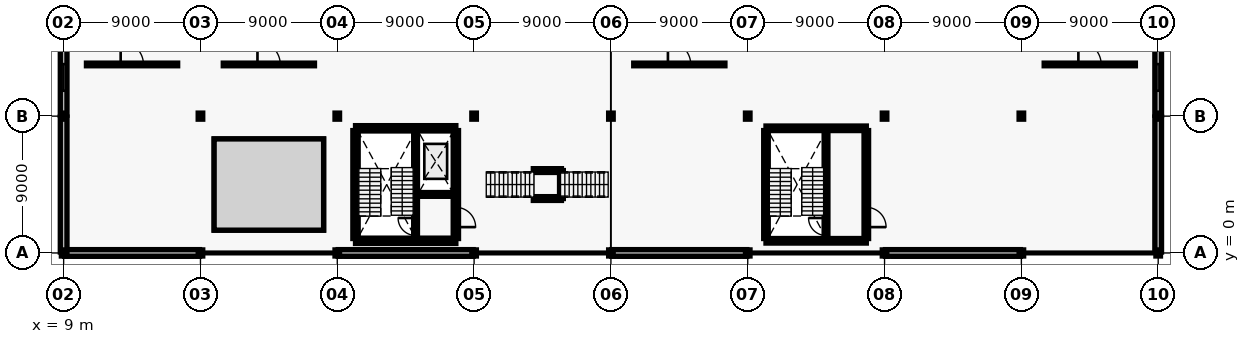
"""IFC4 building model, lengths in metres.
Left out: names, types, materials, properties, quantities, classifications, styles, units other than length and angle.
Written with IfcOpenShell. Run it as: python <this file> out.ifc"""

import sys

from ifc_helpers import new_model, si_unit, direction, frame, frame_2d, origin, origin_2d, place, context, subcontext, project, spatial, rectangle, i_section, extrude, element, fill, save


model = new_model("IFC4")
c1 = context("Model", 3, precision=1e-05, world=origin(), true_north=direction((0.0, 1.0)))
c2 = subcontext(c1, "Body", "Model", "MODEL_VIEW")
j1 = project(units=[si_unit("LENGTHUNIT", "METRE"), si_unit("PLANEANGLEUNIT", "RADIAN")], contexts=[c1])
p1 = place(None, origin())
s1 = spatial("IfcSite", under=j1, at=p1, CompositionType="ELEMENT")
p2 = place(p1, origin())
s2 = spatial("IfcBuilding", under=s1, at=p2, CompositionType="ELEMENT")
p3 = place(p2, frame((0.0, 0.0, 5.4)))
s3 = spatial("IfcBuildingStorey", under=s2, at=p3, CompositionType="ELEMENT", Elevation=5.4)
for number, where, z_axis, x_axis in (
    (1, (9.0, 0.0, 0.0), (0.0, 0.0, 1.0), (1.0, 0.0, 0.0)),
    (2, (9.0, 9.0, 0.0), (0.0, 0.0, 1.0), (1.0, 0.0, 0.0)),
    (3, (18.0, 0.0, 0.0), (0.0, 0.0, 1.0), (1.0, 0.0, 0.0)),
    (4, (18.0, 9.0, 0.0), (0.0, 0.0, 1.0), (1.0, 0.0, 0.0)),
    (5, (27.0, 0.0, 0.0), (0.0, 0.0, 1.0), (1.0, 0.0, 0.0)),
    (6, (27.0, 9.0, 0.0), (0.0, 0.0, 1.0), (1.0, 0.0, 0.0)),
    (7, (36.0, 0.0, 0.0), (0.0, 0.0, 1.0), (1.0, 0.0, 0.0)),
    (8, (36.0, 9.0, 0.0), (0.0, 0.0, 1.0), (1.0, 0.0, 0.0)),
    (9, (45.0, 0.0, 0.0), (0.0, 0.0, 1.0), (1.0, 0.0, 0.0)),
    (10, (45.0, 9.0, 0.0), (0.0, 0.0, 1.0), (1.0, 0.0, 0.0)),
    (11, (54.0, 0.0, 0.0), (0.0, 0.0, 1.0), (1.0, 0.0, 0.0)),
    (12, (54.0, 9.0, 0.0), (0.0, 0.0, 1.0), (1.0, 0.0, 0.0)),
    (13, (63.0, 0.0, 0.0), (0.0, 0.0, 1.0), (1.0, 0.0, 0.0)),
    (14, (63.0, 9.0, 0.0), (0.0, 0.0, 1.0), (1.0, 0.0, 0.0)),
    (15, (72.0, 0.0, 0.0), (0.0, 0.0, 1.0), (1.0, 0.0, 0.0)),
    (16, (72.0, 9.0, 0.0), (0.0, 0.0, 1.0), (1.0, 0.0, 0.0)),
    (17, (81.0, 0.0, 0.0), (0.0, 0.0, 1.0), (1.0, 0.0, 0.0)),
    (18, (81.0, 9.0, 0.0), (0.0, 0.0, 1.0), (1.0, 0.0, 0.0)),
):
    element("IfcColumn", number, at=place(p3, frame(where, z_axis=z_axis, x_axis=x_axis)), inside=s3, PredefinedType="COLUMN", context=c2, shape_type="SweptSolid", body=[
        extrude(i_section(OverallWidth=0.3, OverallDepth=0.4, WebThickness=0.013, FlangeThickness=0.024, FilletRadius=0.027, at=origin_2d()), origin(), (0.0, 0.0, 1.0), 4.2),
    ])
for number, where, z_axis, x_axis in (
    (19, (9.06, 0.0, 0.0), (0.0, 0.0, 1.0), (1.0, 0.0, 0.0)),
    (20, (27.06, 0.0, 0.0), (0.0, 0.0, 1.0), (1.0, 0.0, 0.0)),
    (21, (45.06, 0.0, 0.0), (0.0, 0.0, 1.0), (1.0, 0.0, 0.0)),
    (22, (63.06, 0.0, 0.0), (0.0, 0.0, 1.0), (1.0, 0.0, 0.0)),
    (23, (9.0, 0.06, 0.0), (0.0, 0.0, 1.0), (0.0, 1.0, 0.0)),
):
    element("IfcWall", number, at=place(p3, frame(where, z_axis=z_axis, x_axis=x_axis)), inside=s3, PredefinedType="SOLIDWALL", context=c2, shape_type="SweptSolid", body=[
        extrude(rectangle(XDim=8.88, YDim=0.44, at=frame_2d((4.44, 0.0))), origin(), (0.0, 0.0, 1.0), 3.5),
    ])
p4 = place(p3, frame((9.0, 9.06, 0.0), z_axis=(0.0, 0.0, 1.0), x_axis=(0.0, 1.0, 0.0)))
e24 = element("IfcWall", 24, at=p4, inside=s3, PredefinedType="SOLIDWALL", context=c2, shape_type="SweptSolid", body=[
    extrude(rectangle(XDim=8.88, YDim=0.44, at=frame_2d((4.44, 0.0))), origin(), (0.0, 0.0, 1.0), 3.5),
])
p5 = place(p4, frame((1.611, 0.0, 0.9)))
e25 = element("IfcOpeningElement", 25, at=p5, cuts=e24, PredefinedType="OPENING", context=c2, shape_type="SweptSolid", body=[
    extrude(rectangle(XDim=1.75, YDim=2.25, at=frame_2d((0.875, 1.125))), frame((0.0, 0.23, 0.0), z_axis=(0.0, -1.0, 0.0), x_axis=(1.0, 0.0, 0.0)), (0.0, 0.0, 1.0), 0.46),
])
p6 = place(p4, frame((5.519, 0.0, 0.9)))
e26 = element("IfcOpeningElement", 26, at=p6, cuts=e24, PredefinedType="OPENING", context=c2, shape_type="SweptSolid", body=[
    extrude(rectangle(XDim=1.75, YDim=2.25, at=frame_2d((0.875, 1.125))), frame((0.0, 0.23, 0.0), z_axis=(0.0, -1.0, 0.0), x_axis=(1.0, 0.0, 0.0)), (0.0, 0.0, 1.0), 0.46),
])
p7 = place(p3, frame((81.0, 0.06, 0.0), z_axis=(0.0, 0.0, 1.0), x_axis=(0.0, 1.0, 0.0)))
e27 = element("IfcWall", 27, at=p7, inside=s3, PredefinedType="SOLIDWALL", context=c2, shape_type="SweptSolid", body=[
    extrude(rectangle(XDim=8.88, YDim=0.44, at=frame_2d((4.44, 0.0))), origin(), (0.0, 0.0, 1.0), 3.5),
])
p8 = place(p3, frame((81.0, 9.06, 0.0), z_axis=(0.0, 0.0, 1.0), x_axis=(0.0, 1.0, 0.0)))
e28 = element("IfcWall", 28, at=p8, inside=s3, PredefinedType="SOLIDWALL", context=c2, shape_type="SweptSolid", body=[
    extrude(rectangle(XDim=8.88, YDim=0.44, at=frame_2d((4.44, 0.0))), origin(), (0.0, 0.0, 1.0), 3.5),
])
p9 = place(p8, frame((1.611, 0.0, 0.9)))
e29 = element("IfcOpeningElement", 29, at=p9, cuts=e28, PredefinedType="OPENING", context=c2, shape_type="SweptSolid", body=[
    extrude(rectangle(XDim=1.75, YDim=2.25, at=frame_2d((0.875, 1.125))), frame((0.0, 0.23, 0.0), z_axis=(0.0, -1.0, 0.0), x_axis=(1.0, 0.0, 0.0)), (0.0, 0.0, 1.0), 0.46),
])
p10 = place(p8, frame((5.519, 0.0, 0.9)))
e30 = element("IfcOpeningElement", 30, at=p10, cuts=e28, PredefinedType="OPENING", context=c2, shape_type="SweptSolid", body=[
    extrude(rectangle(XDim=1.75, YDim=2.25, at=frame_2d((0.875, 1.125))), frame((0.0, 0.23, 0.0), z_axis=(0.0, -1.0, 0.0), x_axis=(1.0, 0.0, 0.0)), (0.0, 0.0, 1.0), 0.46),
])
for number, where, z_axis, x_axis in (
    (31, (28.2, 0.8, 0.0), (0.0, 0.0, 1.0), (1.0, 0.0, 0.0)),
    (32, (28.2, 8.2, 0.0), (0.0, 0.0, 1.0), (1.0, 0.0, 0.0)),
):
    element("IfcWall", number, at=place(p3, frame(where, z_axis=z_axis, x_axis=x_axis)), inside=s3, PredefinedType="SHEAR", context=c2, shape_type="SweptSolid", body=[
        extrude(rectangle(XDim=6.6, YDim=0.35, at=frame_2d((3.3, 0.0))), origin(), (0.0, 0.0, 1.0), 4.2),
    ])
p11 = place(p3, frame((28.2, 0.95, 0.0), z_axis=(0.0, 0.0, 1.0), x_axis=(0.0, 1.0, 0.0)))
e33 = element("IfcWall", 33, at=p11, inside=s3, PredefinedType="SHEAR", context=c2, shape_type="SweptSolid", body=[
    extrude(rectangle(XDim=7.1, YDim=0.35, at=frame_2d((3.55, 0.0))), origin(), (0.0, 0.0, 1.0), 4.2),
])
p12 = place(p3, frame((34.8, 0.95, 0.0), z_axis=(0.0, 0.0, 1.0), x_axis=(0.0, 1.0, 0.0)))
e34 = element("IfcWall", 34, at=p12, inside=s3, PredefinedType="SHEAR", context=c2, shape_type="SweptSolid", body=[
    extrude(rectangle(XDim=7.1, YDim=0.35, at=frame_2d((3.55, 0.0))), origin(), (0.0, 0.0, 1.0), 4.2),
])
p13 = place(p12, frame((0.75, 0.0, 0.0)))
e35 = element("IfcOpeningElement", 35, at=p13, cuts=e34, PredefinedType="OPENING", context=c2, shape_type="SweptSolid", body=[
    extrude(rectangle(XDim=1.3, YDim=2.15, at=frame_2d((0.65, 1.075))), frame((0.0, 0.185, 0.0), z_axis=(0.0, -1.0, 0.0), x_axis=(1.0, 0.0, 0.0)), (0.0, 0.0, 1.0), 0.37),
])
p14 = place(p3, frame((32.15, 0.95, 0.0), z_axis=(0.0, 0.0, 1.0), x_axis=(0.0, 1.0, 0.0)))
e36 = element("IfcWall", 36, at=p14, inside=s3, PredefinedType="SHEAR", context=c2, shape_type="SweptSolid", body=[
    extrude(rectangle(XDim=7.1, YDim=0.25, at=frame_2d((3.55, 0.0))), origin(), (0.0, 0.0, 1.0), 4.2),
])
p15 = place(p14, frame((0.2, 0.0, 0.0)))
e37 = element("IfcOpeningElement", 37, at=p15, cuts=e36, PredefinedType="OPENING", context=c2, shape_type="SweptSolid", body=[
    extrude(rectangle(XDim=1.15, YDim=2.15, at=frame_2d((0.575, 1.075))), frame((0.0, 0.135, 0.0), z_axis=(0.0, -1.0, 0.0), x_axis=(1.0, 0.0, 0.0)), (0.0, 0.0, 1.0), 0.27),
])
p16 = place(p3, frame((32.27, 3.85, 0.0), z_axis=(0.0, 0.0, 1.0), x_axis=(1.0, 0.0, 0.0)))
e38 = element("IfcWall", 38, at=p16, inside=s3, PredefinedType="SHEAR", context=c2, shape_type="SweptSolid", body=[
    extrude(rectangle(XDim=2.38, YDim=0.25, at=frame_2d((1.19, 0.0))), origin(), (0.0, 0.0, 1.0), 4.2),
])
p17 = place(p16, frame((0.64, 0.0, 0.0)))
e39 = element("IfcOpeningElement", 39, at=p17, cuts=e38, PredefinedType="OPENING", context=c2, shape_type="SweptSolid", body=[
    extrude(rectangle(XDim=1.1, YDim=2.15, at=frame_2d((0.55, 1.075))), frame((0.0, 0.135, 0.0), z_axis=(0.0, -1.0, 0.0), x_axis=(1.0, 0.0, 0.0)), (0.0, 0.0, 1.0), 0.27),
])
for number, where, z_axis, x_axis in (
    (40, (55.2, 0.8, 0.0), (0.0, 0.0, 1.0), (1.0, 0.0, 0.0)),
    (41, (55.2, 8.2, 0.0), (0.0, 0.0, 1.0), (1.0, 0.0, 0.0)),
):
    element("IfcWall", number, at=place(p3, frame(where, z_axis=z_axis, x_axis=x_axis)), inside=s3, PredefinedType="SHEAR", context=c2, shape_type="SweptSolid", body=[
        extrude(rectangle(XDim=6.6, YDim=0.3, at=frame_2d((3.3, 0.0))), origin(), (0.0, 0.0, 1.0), 4.2),
    ])
p18 = place(p3, frame((55.2, 0.95, 0.0), z_axis=(0.0, 0.0, 1.0), x_axis=(0.0, 1.0, 0.0)))
e42 = element("IfcWall", 42, at=p18, inside=s3, PredefinedType="SHEAR", context=c2, shape_type="SweptSolid", body=[
    extrude(rectangle(XDim=7.1, YDim=0.3, at=frame_2d((3.55, 0.0))), origin(), (0.0, 0.0, 1.0), 4.2),
])
p19 = place(p3, frame((61.8, 0.95, 0.0), z_axis=(0.0, 0.0, 1.0), x_axis=(0.0, 1.0, 0.0)))
e43 = element("IfcWall", 43, at=p19, inside=s3, PredefinedType="SHEAR", context=c2, shape_type="SweptSolid", body=[
    extrude(rectangle(XDim=7.1, YDim=0.3, at=frame_2d((3.55, 0.0))), origin(), (0.0, 0.0, 1.0), 4.2),
])
p20 = place(p19, frame((0.75, 0.0, 0.0)))
e44 = element("IfcOpeningElement", 44, at=p20, cuts=e43, PredefinedType="OPENING", context=c2, shape_type="SweptSolid", body=[
    extrude(rectangle(XDim=1.3, YDim=2.15, at=frame_2d((0.65, 1.075))), frame((0.0, 0.16, 0.0), z_axis=(0.0, -1.0, 0.0), x_axis=(1.0, 0.0, 0.0)), (0.0, 0.0, 1.0), 0.32),
])
p21 = place(p3, frame((59.15, 0.95, 0.0), z_axis=(0.0, 0.0, 1.0), x_axis=(0.0, 1.0, 0.0)))
e45 = element("IfcWall", 45, at=p21, inside=s3, PredefinedType="SHEAR", context=c2, shape_type="SweptSolid", body=[
    extrude(rectangle(XDim=7.1, YDim=0.25, at=frame_2d((3.55, 0.0))), origin(), (0.0, 0.0, 1.0), 4.2),
])
p22 = place(p21, frame((0.2, 0.0, 0.0)))
e46 = element("IfcOpeningElement", 46, at=p22, cuts=e45, PredefinedType="OPENING", context=c2, shape_type="SweptSolid", body=[
    extrude(rectangle(XDim=1.15, YDim=2.15, at=frame_2d((0.575, 1.075))), frame((0.0, 0.135, 0.0), z_axis=(0.0, -1.0, 0.0), x_axis=(1.0, 0.0, 0.0)), (0.0, 0.0, 1.0), 0.27),
])
for number, where, z_axis, x_axis in (
    (47, (39.895, 3.58, 0.0), (0.0, 0.0, 1.0), (1.0, 0.0, 0.0)),
    (48, (39.895, 5.42, 0.0), (0.0, 0.0, 1.0), (1.0, 0.0, 0.0)),
):
    element("IfcWall", number, at=place(p3, frame(where, z_axis=z_axis, x_axis=x_axis)), inside=s3, PredefinedType="SHEAR", context=c2, shape_type="SweptSolid", body=[
        extrude(rectangle(XDim=1.85, YDim=0.25, at=frame_2d((0.925, 0.0))), origin(), (0.0, 0.0, 1.0), 1.86),
    ])
p23 = place(p3, frame((41.745, 3.58, 0.0), z_axis=(0.0, 0.0, 1.0), x_axis=(0.0, 1.0, 0.0)))
e49 = element("IfcWall", 49, at=p23, inside=s3, PredefinedType="SHEAR", context=c2, shape_type="SweptSolid", body=[
    extrude(rectangle(XDim=1.84, YDim=0.25, at=frame_2d((0.92, 0.0))), origin(), (0.0, 0.0, 1.0), 1.86),
])
p24 = place(p3, frame((10.5, 12.4, 0.0), z_axis=(0.0, 0.0, 1.0), x_axis=(1.0, 0.0, 0.0)))
e50 = element("IfcWall", 50, at=p24, inside=s3, PredefinedType="PARTITIONING", context=c2, shape_type="SweptSolid", body=[
    extrude(rectangle(XDim=6.0, YDim=0.175, at=frame_2d((3.0, 0.0))), origin(), (0.0, 0.0, 1.0), 3.2),
])
p25 = place(p24, frame((2.25, 0.0, 0.0)))
e51 = element("IfcOpeningElement", 51, at=p25, cuts=e50, PredefinedType="OPENING", context=c2, shape_type="SweptSolid", body=[
    extrude(rectangle(XDim=1.5, YDim=2.2, at=frame_2d((0.75, 1.1))), frame((0.0, 0.097, 0.0), z_axis=(0.0, -1.0, 0.0), x_axis=(1.0, 0.0, 0.0)), (0.0, 0.0, 1.0), 0.195),
])
p26 = place(p3, frame((19.5, 12.4, 0.0), z_axis=(0.0, 0.0, 1.0), x_axis=(1.0, 0.0, 0.0)))
e52 = element("IfcWall", 52, at=p26, inside=s3, PredefinedType="PARTITIONING", context=c2, shape_type="SweptSolid", body=[
    extrude(rectangle(XDim=6.0, YDim=0.175, at=frame_2d((3.0, 0.0))), origin(), (0.0, 0.0, 1.0), 3.2),
])
p27 = place(p26, frame((2.25, 0.0, 0.0)))
e53 = element("IfcOpeningElement", 53, at=p27, cuts=e52, PredefinedType="OPENING", context=c2, shape_type="SweptSolid", body=[
    extrude(rectangle(XDim=1.5, YDim=2.2, at=frame_2d((0.75, 1.1))), frame((0.0, 0.097, 0.0), z_axis=(0.0, -1.0, 0.0), x_axis=(1.0, 0.0, 0.0)), (0.0, 0.0, 1.0), 0.195),
])
p28 = place(p3, frame((46.5, 12.4, 0.0), z_axis=(0.0, 0.0, 1.0), x_axis=(1.0, 0.0, 0.0)))
e54 = element("IfcWall", 54, at=p28, inside=s3, PredefinedType="PARTITIONING", context=c2, shape_type="SweptSolid", body=[
    extrude(rectangle(XDim=6.0, YDim=0.175, at=frame_2d((3.0, 0.0))), origin(), (0.0, 0.0, 1.0), 3.2),
])
p29 = place(p28, frame((2.25, 0.0, 0.0)))
e55 = element("IfcOpeningElement", 55, at=p29, cuts=e54, PredefinedType="OPENING", context=c2, shape_type="SweptSolid", body=[
    extrude(rectangle(XDim=1.5, YDim=2.2, at=frame_2d((0.75, 1.1))), frame((0.0, 0.097, 0.0), z_axis=(0.0, -1.0, 0.0), x_axis=(1.0, 0.0, 0.0)), (0.0, 0.0, 1.0), 0.195),
])
p30 = place(p3, frame((73.5, 12.4, 0.0), z_axis=(0.0, 0.0, 1.0), x_axis=(1.0, 0.0, 0.0)))
e56 = element("IfcWall", 56, at=p30, inside=s3, PredefinedType="PARTITIONING", context=c2, shape_type="SweptSolid", body=[
    extrude(rectangle(XDim=6.0, YDim=0.175, at=frame_2d((3.0, 0.0))), origin(), (0.0, 0.0, 1.0), 3.2),
])
p31 = place(p30, frame((2.25, 0.0, 0.0)))
e57 = element("IfcOpeningElement", 57, at=p31, cuts=e56, PredefinedType="OPENING", context=c2, shape_type="SweptSolid", body=[
    extrude(rectangle(XDim=1.5, YDim=2.2, at=frame_2d((0.75, 1.1))), frame((0.0, 0.097, 0.0), z_axis=(0.0, -1.0, 0.0), x_axis=(1.0, 0.0, 0.0)), (0.0, 0.0, 1.0), 0.195),
])
p32 = place(p5, origin())
e58 = element("IfcWindow", 58, at=p32, inside=s3, PartitioningType="SINGLE_PANEL", PredefinedType="WINDOW", context=c2, shape_type="SweptSolid", body=[
    extrude(rectangle(XDim=1.75, YDim=2.25, at=frame_2d((0.875, 1.125))), frame((0.0, 0.03, 0.0), z_axis=(0.0, -1.0, 0.0), x_axis=(1.0, 0.0, 0.0)), (0.0, 0.0, 1.0), 0.06),
])
fill(e25, e58)
p33 = place(p9, origin())
e59 = element("IfcWindow", 59, at=p33, inside=s3, PartitioningType="SINGLE_PANEL", PredefinedType="WINDOW", context=c2, shape_type="SweptSolid", body=[
    extrude(rectangle(XDim=1.75, YDim=2.25, at=frame_2d((0.875, 1.125))), frame((0.0, 0.03, 0.0), z_axis=(0.0, -1.0, 0.0), x_axis=(1.0, 0.0, 0.0)), (0.0, 0.0, 1.0), 0.06),
])
fill(e29, e59)
p34 = place(p13, frame((1.3, 0.0, 0.0), z_axis=(0.0, 0.0, 1.0), x_axis=(-1.0, 0.0, 0.0)))
e60 = element("IfcDoor", 60, at=p34, inside=s3, OperationType="DOUBLE_DOOR_SINGLE_SWING", PredefinedType="DOOR", context=c2, shape_type="SweptSolid", body=[
    extrude(rectangle(XDim=1.3, YDim=2.15, at=frame_2d((0.65, 1.075))), frame((0.0, 0.025, 0.0), z_axis=(0.0, -1.0, 0.0), x_axis=(1.0, 0.0, 0.0)), (0.0, 0.0, 1.0), 0.05),
])
fill(e35, e60)
p35 = place(p15, frame((1.15, 0.0, 0.0), z_axis=(0.0, 0.0, 1.0), x_axis=(-1.0, 0.0, 0.0)))
e61 = element("IfcDoor", 61, at=p35, inside=s3, OperationType="SINGLE_SWING_RIGHT", PredefinedType="DOOR", context=c2, shape_type="SweptSolid", body=[
    extrude(rectangle(XDim=1.15, YDim=2.15, at=frame_2d((0.575, 1.075))), frame((0.0, 0.025, 0.0), z_axis=(0.0, -1.0, 0.0), x_axis=(1.0, 0.0, 0.0)), (0.0, 0.0, 1.0), 0.05),
])
fill(e37, e61)
p36 = place(p17, origin())
e62 = element("IfcDoor", 62, at=p36, inside=s3, OperationType="SLIDING_TO_LEFT", PredefinedType="DOOR", context=c2, shape_type="SweptSolid", body=[
    extrude(rectangle(XDim=1.1, YDim=2.15, at=frame_2d((0.55, 1.075))), frame((0.0, 0.025, 0.0), z_axis=(0.0, -1.0, 0.0), x_axis=(1.0, 0.0, 0.0)), (0.0, 0.0, 1.0), 0.05),
])
fill(e39, e62)
p37 = place(p20, frame((1.3, 0.0, 0.0), z_axis=(0.0, 0.0, 1.0), x_axis=(-1.0, 0.0, 0.0)))
e63 = element("IfcDoor", 63, at=p37, inside=s3, OperationType="DOUBLE_DOOR_SINGLE_SWING", PredefinedType="DOOR", context=c2, shape_type="SweptSolid", body=[
    extrude(rectangle(XDim=1.3, YDim=2.15, at=frame_2d((0.65, 1.075))), frame((0.0, 0.025, 0.0), z_axis=(0.0, -1.0, 0.0), x_axis=(1.0, 0.0, 0.0)), (0.0, 0.0, 1.0), 0.05),
])
fill(e44, e63)
p38 = place(p22, frame((1.15, 0.0, 0.0), z_axis=(0.0, 0.0, 1.0), x_axis=(-1.0, 0.0, 0.0)))
e64 = element("IfcDoor", 64, at=p38, inside=s3, OperationType="SINGLE_SWING_RIGHT", PredefinedType="DOOR", context=c2, shape_type="SweptSolid", body=[
    extrude(rectangle(XDim=1.15, YDim=2.15, at=frame_2d((0.575, 1.075))), frame((0.0, 0.025, 0.0), z_axis=(0.0, -1.0, 0.0), x_axis=(1.0, 0.0, 0.0)), (0.0, 0.0, 1.0), 0.05),
])
fill(e46, e64)
p39 = place(p25, origin())
e65 = element("IfcDoor", 65, at=p39, inside=s3, OperationType="DOUBLE_DOOR_SINGLE_SWING", PredefinedType="DOOR", context=c2, shape_type="SweptSolid", body=[
    extrude(rectangle(XDim=1.5, YDim=2.2, at=frame_2d((0.75, 1.1))), frame((0.0, 0.025, 0.0), z_axis=(0.0, -1.0, 0.0), x_axis=(1.0, 0.0, 0.0)), (0.0, 0.0, 1.0), 0.05),
])
fill(e51, e65)
p40 = place(p27, origin())
e66 = element("IfcDoor", 66, at=p40, inside=s3, OperationType="DOUBLE_DOOR_SINGLE_SWING", PredefinedType="DOOR", context=c2, shape_type="SweptSolid", body=[
    extrude(rectangle(XDim=1.5, YDim=2.2, at=frame_2d((0.75, 1.1))), frame((0.0, 0.025, 0.0), z_axis=(0.0, -1.0, 0.0), x_axis=(1.0, 0.0, 0.0)), (0.0, 0.0, 1.0), 0.05),
])
fill(e53, e66)
p41 = place(p29, origin())
e67 = element("IfcDoor", 67, at=p41, inside=s3, OperationType="DOUBLE_DOOR_SINGLE_SWING", PredefinedType="DOOR", context=c2, shape_type="SweptSolid", body=[
    extrude(rectangle(XDim=1.5, YDim=2.2, at=frame_2d((0.75, 1.1))), frame((0.0, 0.025, 0.0), z_axis=(0.0, -1.0, 0.0), x_axis=(1.0, 0.0, 0.0)), (0.0, 0.0, 1.0), 0.05),
])
fill(e55, e67)
p42 = place(p31, origin())
e68 = element("IfcDoor", 68, at=p42, inside=s3, OperationType="DOUBLE_DOOR_SINGLE_SWING", PredefinedType="DOOR", context=c2, shape_type="SweptSolid", body=[
    extrude(rectangle(XDim=1.5, YDim=2.2, at=frame_2d((0.75, 1.1))), frame((0.0, 0.025, 0.0), z_axis=(0.0, -1.0, 0.0), x_axis=(1.0, 0.0, 0.0)), (0.0, 0.0, 1.0), 0.05),
])
fill(e57, e68)
save(model, sys.argv[1])
